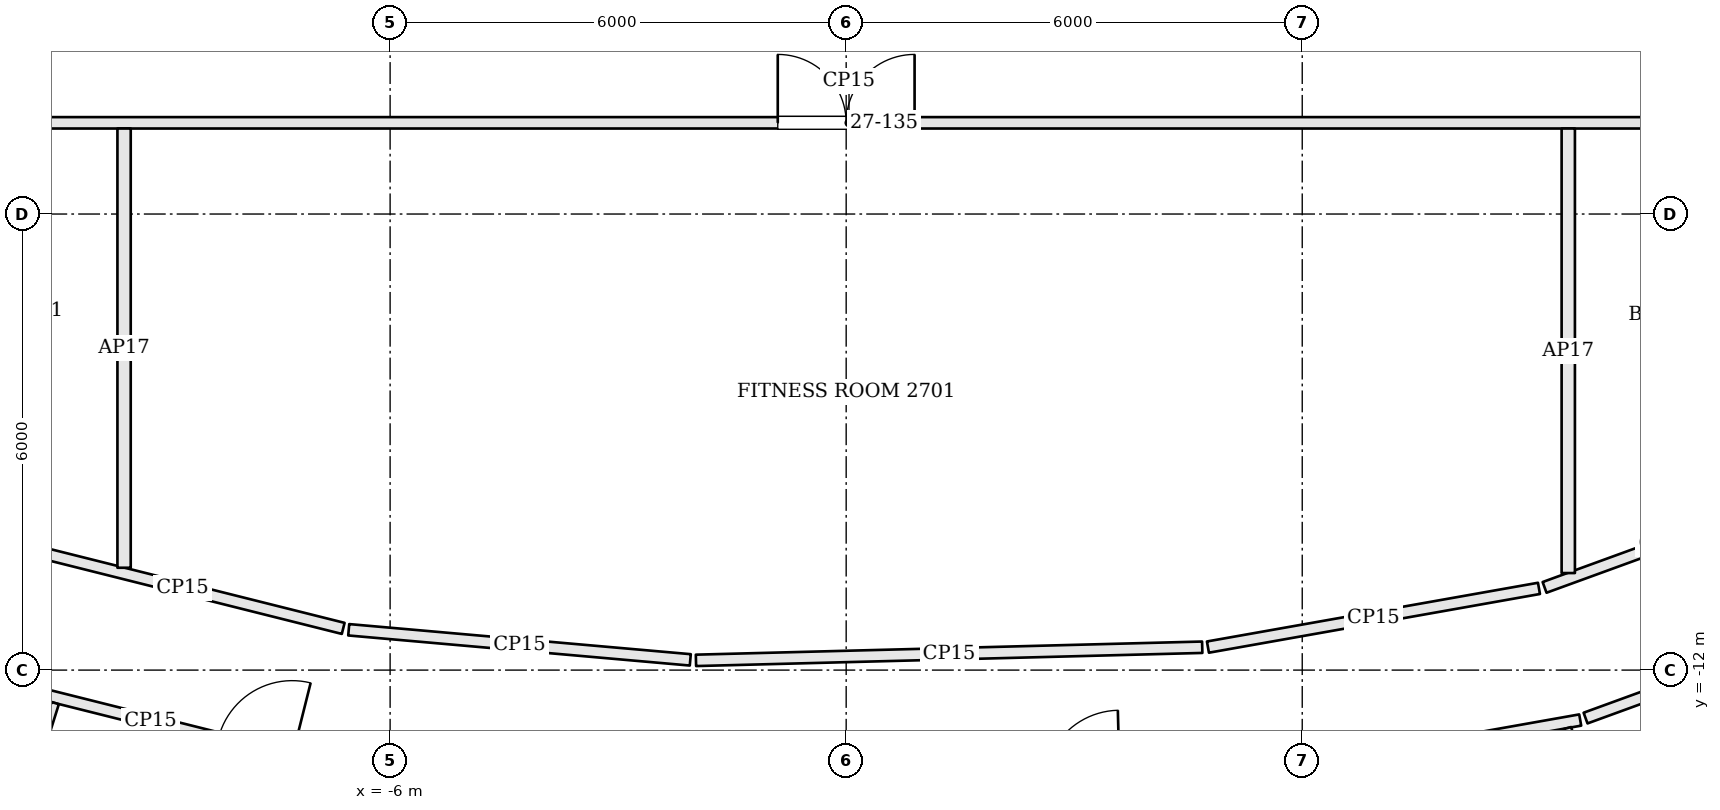
"""IFC4 building model, lengths in metres.
Left out: names, types, materials, properties, quantities, classifications, styles, units other than length and angle.
Written with IfcOpenShell. Run it as: python <this file> out.ifc"""

import sys

from ifc_helpers import new_model, si_unit, direction, frame, frame_2d, origin, place, context, subcontext, project, spatial, rectangle, extrude, element, fill, save


model = new_model("IFC4")
c1 = context("Model", 3, precision=1e-05, world=origin(), true_north=direction((0.0, 1.0)))
c2 = subcontext(c1, "Body", "Model", "MODEL_VIEW")
j1 = project(units=[si_unit("LENGTHUNIT", "METRE"), si_unit("PLANEANGLEUNIT", "RADIAN")], contexts=[c1])
p1 = place(None, origin())
s1 = spatial("IfcSite", under=j1, at=p1, CompositionType="ELEMENT")
p2 = place(p1, origin())
s2 = spatial("IfcBuilding", under=s1, at=p2, CompositionType="ELEMENT")
p3 = place(p2, frame((0.0, 0.0, 114.0)))
s3 = spatial("IfcBuildingStorey", under=s2, at=p3, CompositionType="ELEMENT", Elevation=114.0)
p4 = place(p3, frame((6.057, -13.295, 0.0), z_axis=(0.0, 0.0, 1.0), x_axis=(0.984639377301, 0.174600391377, 0.0)))
e1 = element("IfcWall", 1, at=p4, inside=s3, PredefinedType="PARTITIONING", context=c2, shape_type="SweptSolid", body=[
    extrude(rectangle(XDim=3.656, YDim=0.15, at=frame_2d((1.828, 0.0))), origin(), (0.0, 0.0, 1.0), 2.784),
])
p5 = place(p3, frame((9.728, -12.631, 0.0), z_axis=(0.0, 0.0, 1.0), x_axis=(0.939626438181, 0.342201923826, 0.0)))
e2 = element("IfcWall", 2, at=p5, inside=s3, PredefinedType="PARTITIONING", context=c2, shape_type="SweptSolid", body=[
    extrude(rectangle(XDim=3.716, YDim=0.15, at=frame_2d((1.858, 0.0))), origin(), (0.0, 0.0, 1.0), 2.784),
])
p6 = place(p3, frame((-11.46, -12.093, 0.0), z_axis=(0.0, 0.0, 1.0), x_axis=(0.969988379079, -0.243151278945, 0.0)))
e3 = element("IfcWall", 3, at=p6, inside=s3, PredefinedType="PARTITIONING", context=c2, shape_type="SweptSolid", body=[
    extrude(rectangle(XDim=4.758, YDim=0.15, at=frame_2d((2.379, 0.0))), origin(), (0.0, 0.0, 1.0), 2.784),
])
p7 = place(p6, frame((3.3, 0.0, 0.0)))
e4 = element("IfcOpeningElement", 4, at=p7, cuts=e3, PredefinedType="OPENING", context=c2, shape_type="SweptSolid", body=[
    extrude(rectangle(XDim=1.0, YDim=2.1, at=frame_2d((0.5, 1.05))), frame((0.0, 0.085, 0.0), z_axis=(0.0, -1.0, 0.0), x_axis=(1.0, 0.0, 0.0)), (0.0, 0.0, 1.0), 0.17),
])
p8 = place(p3, frame((12.353, -9.76, 0.0), z_axis=(0.0, 0.0, 1.0), x_axis=(-0.939632450309, -0.342185415127, 0.0)))
e5 = element("IfcWall", 5, at=p8, inside=s3, PredefinedType="PARTITIONING", context=c2, shape_type="SweptSolid", body=[
    extrude(rectangle(XDim=3.368, YDim=0.15, at=frame_2d((1.684, 0.0))), origin(), (0.0, 0.0, 1.0), 2.784),
])
p9 = place(p3, frame((9.115, -10.925, 0.0), z_axis=(0.0, 0.0, 1.0), x_axis=(-0.984632605417, -0.174638576352, 0.0)))
e6 = element("IfcWall", 6, at=p9, inside=s3, PredefinedType="PARTITIONING", context=c2, shape_type="SweptSolid", body=[
    extrude(rectangle(XDim=4.423, YDim=0.15, at=frame_2d((2.211, 0.0))), origin(), (0.0, 0.0, 1.0), 2.784),
])
p10 = place(p3, frame((4.684, -11.699, 0.0), z_axis=(0.0, 0.0, 1.0), x_axis=(-0.999663438204, -0.025942442425, 0.0)))
e7 = element("IfcWall", 7, at=p10, inside=s3, PredefinedType="PARTITIONING", context=c2, shape_type="SweptSolid", body=[
    extrude(rectangle(XDim=6.663, YDim=0.15, at=frame_2d((3.332, 0.0))), origin(), (0.0, 0.0, 1.0), 2.784),
])
p11 = place(p3, frame((-2.051, -11.865, 0.0), z_axis=(0.0, 0.0, 1.0), x_axis=(-0.996139599493, 0.087783246245, 0.0)))
e8 = element("IfcWall", 8, at=p11, inside=s3, PredefinedType="PARTITIONING", context=c2, shape_type="SweptSolid", body=[
    extrude(rectangle(XDim=4.511, YDim=0.15, at=frame_2d((2.255, 0.0))), origin(), (0.0, 0.0, 1.0), 2.784),
])
p12 = place(p3, frame((-6.617, -11.451, 0.0), z_axis=(0.0, 0.0, 1.0), x_axis=(-0.969987441267, 0.243155020069, 0.0)))
e9 = element("IfcWall", 9, at=p12, inside=s3, PredefinedType="PARTITIONING", context=c2, shape_type="SweptSolid", body=[
    extrude(rectangle(XDim=4.359, YDim=0.15, at=frame_2d((2.179, 0.0))), origin(), (0.0, 0.0, 1.0), 2.784),
])
p13 = place(p3, frame((-14.725, -4.8, 0.0), z_axis=(0.0, 0.0, 1.0), x_axis=(1.0, 0.0, 0.0)))
e10 = element("IfcWall", 10, at=p13, inside=s3, PredefinedType="PARTITIONING", context=c2, shape_type="SweptSolid", body=[
    extrude(rectangle(XDim=29.525, YDim=0.15, at=frame_2d((14.763, 0.0))), origin(), (0.0, 0.0, 1.0), 2.784),
])
p14 = place(p13, frame((13.825, 0.0, 0.0)))
e11 = element("IfcOpeningElement", 11, at=p14, cuts=e10, PredefinedType="OPENING", context=c2, shape_type="SweptSolid", body=[
    extrude(rectangle(XDim=1.8, YDim=2.1, at=frame_2d((0.9, 1.05))), frame((0.0, 0.085, 0.0), z_axis=(0.0, -1.0, 0.0), x_axis=(1.0, 0.0, 0.0)), (0.0, 0.0, 1.0), 0.17),
])
p15 = place(p3, frame((9.49, -12.762, 0.0), z_axis=(0.0, 0.0, 1.0), x_axis=(0.264041724806, -0.96451125839, 0.0)))
e12 = element("IfcWall", 12, at=p15, inside=s3, PredefinedType="PARTITIONING", context=c2, shape_type="SweptSolid", body=[
    extrude(rectangle(XDim=2.525, YDim=0.1, at=frame_2d((1.263, 0.0))), origin(), (0.0, 0.0, 1.0), 2.884),
])
p16 = place(p15, frame((1.2, 0.0, 0.0)))
e13 = element("IfcOpeningElement", 13, at=p16, cuts=e12, PredefinedType="OPENING", context=c2, shape_type="SweptSolid", body=[
    extrude(rectangle(XDim=0.8, YDim=2.1, at=frame_2d((0.4, 1.05))), frame((0.0, 0.06, 0.0), z_axis=(0.0, -1.0, 0.0), x_axis=(1.0, 0.0, 0.0)), (0.0, 0.0, 1.0), 0.12),
])
p17 = place(p3, frame((-10.769, -20.311, 0.0), z_axis=(0.0, 0.0, 1.0), x_axis=(0.235780843646, 0.971806253206, 0.0)))
e14 = element("IfcWall", 14, at=p17, inside=s3, PredefinedType="PARTITIONING", context=c2, shape_type="SweptSolid", body=[
    extrude(rectangle(XDim=7.729, YDim=0.1, at=frame_2d((3.864, 0.0))), origin(), (0.0, 0.0, 1.0), 2.884),
])
p18 = place(p17, frame((3.654, 0.0, 0.0)))
e15 = element("IfcOpeningElement", 15, at=p18, cuts=e14, PredefinedType="OPENING", context=c2, shape_type="SweptSolid", body=[
    extrude(rectangle(XDim=0.9, YDim=2.4, at=frame_2d((0.45, 1.2))), frame((0.0, 0.06, 0.0), z_axis=(0.0, -1.0, 0.0), x_axis=(1.0, 0.0, 0.0)), (0.0, 0.0, 1.0), 0.12),
])
p19 = place(p3, frame((-10.406, -12.434, 0.0), z_axis=(0.0, 0.0, 1.0), x_axis=(-0.300404792704, -0.95381180561, 0.0)))
e16 = element("IfcWall", 16, at=p19, inside=s3, PredefinedType="PARTITIONING", context=c2, shape_type="SweptSolid", body=[
    extrude(rectangle(XDim=2.525, YDim=0.1, at=frame_2d((1.263, 0.0))), origin(), (0.0, 0.0, 1.0), 2.884),
])
p20 = place(p19, frame((1.2, 0.0, 0.0)))
e17 = element("IfcOpeningElement", 17, at=p20, cuts=e16, PredefinedType="OPENING", context=c2, shape_type="SweptSolid", body=[
    extrude(rectangle(XDim=0.8, YDim=2.1, at=frame_2d((0.4, 1.05))), frame((0.0, 0.06, 0.0), z_axis=(0.0, -1.0, 0.0), x_axis=(1.0, 0.0, 0.0)), (0.0, 0.0, 1.0), 0.12),
])
p21 = place(p3, frame((-9.5, -10.654, 0.0), z_axis=(0.0, 0.0, 1.0), x_axis=(0.0, 1.0, 0.0)))
e18 = element("IfcWall", 18, at=p21, inside=s3, PredefinedType="PARTITIONING", context=c2, shape_type="SweptSolid", body=[
    extrude(rectangle(XDim=5.779, YDim=0.175, at=frame_2d((2.889, 0.0))), origin(), (0.0, 0.0, 1.0), 2.784),
])
p22 = place(p3, frame((9.5, -10.723, 0.0), z_axis=(0.0, 0.0, 1.0), x_axis=(0.0, 1.0, 0.0)))
e19 = element("IfcWall", 19, at=p22, inside=s3, PredefinedType="PARTITIONING", context=c2, shape_type="SweptSolid", body=[
    extrude(rectangle(XDim=5.848, YDim=0.175, at=frame_2d((2.924, 0.0))), origin(), (0.0, 0.0, 1.0), 2.784),
])
p23 = place(p14, origin())
e20 = element("IfcDoor", 20, at=p23, inside=s3, OperationType="DOUBLE_DOOR_SINGLE_SWING", PredefinedType="DOOR", context=c2, shape_type="SweptSolid", body=[
    extrude(rectangle(XDim=1.8, YDim=2.1, at=frame_2d((0.9, 1.05))), frame((0.0, 0.025, 0.0), z_axis=(0.0, -1.0, 0.0), x_axis=(1.0, 0.0, 0.0)), (0.0, 0.0, 1.0), 0.05),
])
fill(e11, e20)
save(model, sys.argv[1])
